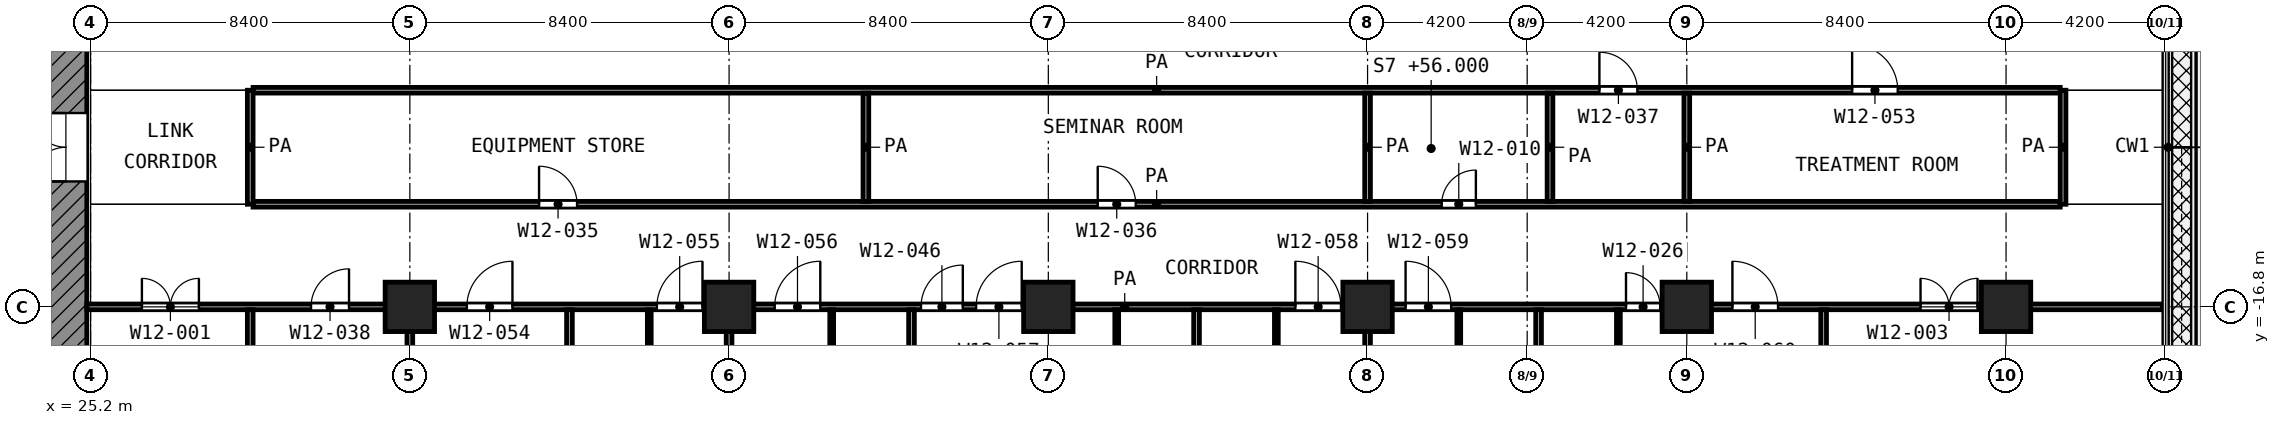
"""IFC4 building model, lengths in metres.
Left out: names, types, materials, properties, quantities, classifications, styles, units other than length and angle.
Written with IfcOpenShell. Run it as: python <this file> out.ifc"""

import sys

from ifc_helpers import new_model, si_unit, direction, frame, frame_2d, origin, origin_2d, place, context, subcontext, project, spatial, rectangle, extrude, element, fill, save


model = new_model("IFC4")
c1 = context("Model", 3, precision=1e-05, world=origin(), true_north=direction((0.0, 1.0)))
c2 = subcontext(c1, "Body", "Model", "MODEL_VIEW")
j1 = project(units=[si_unit("LENGTHUNIT", "METRE"), si_unit("PLANEANGLEUNIT", "RADIAN")], contexts=[c1])
p1 = place(None, origin())
s1 = spatial("IfcSite", under=j1, at=p1, CompositionType="ELEMENT")
p2 = place(p1, origin())
s2 = spatial("IfcBuilding", under=s1, at=p2, CompositionType="ELEMENT")
p3 = place(p2, frame((0.0, 0.0, 56.0)))
s3 = spatial("IfcBuildingStorey", under=s2, at=p3, CompositionType="ELEMENT", Elevation=56.0)
for number, where, z_axis, x_axis in (
    (1, (33.6, -16.8, 0.0), (0.0, 0.0, 1.0), (1.0, 0.0, 0.0)),
    (2, (42.0, -16.8, 0.0), (0.0, 0.0, 1.0), (1.0, 0.0, 0.0)),
    (3, (50.4, -16.8, 0.0), (0.0, 0.0, 1.0), (1.0, 0.0, 0.0)),
    (4, (58.8, -16.8, 0.0), (0.0, 0.0, 1.0), (1.0, 0.0, 0.0)),
    (5, (67.2, -16.8, 0.0), (0.0, 0.0, 1.0), (1.0, 0.0, 0.0)),
    (6, (75.6, -16.8, 0.0), (0.0, 0.0, 1.0), (1.0, 0.0, 0.0)),
):
    element("IfcColumn", number, at=place(p3, frame(where, z_axis=z_axis, x_axis=x_axis)), inside=s3, PredefinedType="COLUMN", context=c2, shape_type="SweptSolid", body=[
        extrude(rectangle(XDim=1.3, YDim=1.3, at=origin_2d()), origin(), (0.0, 0.0, 1.0), 4.2),
    ])
p4 = place(p3, frame((24.55, -24.0, 0.0), z_axis=(0.0, 0.0, 1.0), x_axis=(0.0, 1.0, 0.0)))
e7 = element("IfcWall", 7, at=p4, inside=s3, PredefinedType="SHEAR", context=c2, shape_type="SweptSolid", body=[
    extrude(rectangle(XDim=18.6, YDim=1.1, at=frame_2d((9.3, 0.0))), origin(), (0.0, 0.0, 1.0), 3.9),
])
p5 = place(p4, frame((10.5, 0.0, 0.0)))
e8 = element("IfcOpeningElement", 8, at=p5, cuts=e7, PredefinedType="OPENING", context=c2, shape_type="SweptSolid", body=[
    extrude(rectangle(XDim=1.8, YDim=2.1, at=frame_2d((0.9, 1.05))), frame((0.0, 0.56, 0.0), z_axis=(0.0, -1.0, 0.0), x_axis=(1.0, 0.0, 0.0)), (0.0, 0.0, 1.0), 1.12),
])
for number, where, z_axis, x_axis in (
    (9, (39.9, -19.5, 0.0), (0.0, 0.0, 1.0), (0.0, 1.0, 0.0)),
    (10, (44.7, -19.5, 0.0), (0.0, 0.0, 1.0), (0.0, 1.0, 0.0)),
):
    element("IfcWall", number, at=place(p3, frame(where, z_axis=z_axis, x_axis=x_axis)), inside=s3, PredefinedType="PARTITIONING", context=c2, shape_type="SweptSolid", body=[
        extrude(rectangle(XDim=2.625, YDim=0.1, at=frame_2d((1.312, 0.0))), origin(), (0.0, 0.0, 1.0), 3.9),
    ])
p6 = place(p3, frame((52.2, -19.499, 0.0), z_axis=(0.0, 0.0, 1.0), x_axis=(0.0, 1.0, 0.0)))
e11 = element("IfcWall", 11, at=p6, inside=s3, PredefinedType="PARTITIONING", context=c2, shape_type="SweptSolid", body=[
    extrude(rectangle(XDim=2.624, YDim=0.1, at=frame_2d((1.312, 0.0))), origin(), (0.0, 0.0, 1.0), 3.9),
])
for number, where, z_axis, x_axis in (
    (12, (56.4, -19.5, 0.0), (0.0, 0.0, 1.0), (0.0, 1.0, 0.0)),
    (13, (61.2, -19.5, 0.0), (0.0, 0.0, 1.0), (0.0, 1.0, 0.0)),
):
    element("IfcWall", number, at=place(p3, frame(where, z_axis=z_axis, x_axis=x_axis)), inside=s3, PredefinedType="PARTITIONING", context=c2, shape_type="SweptSolid", body=[
        extrude(rectangle(XDim=2.625, YDim=0.1, at=frame_2d((1.312, 0.0))), origin(), (0.0, 0.0, 1.0), 3.9),
    ])
p7 = place(p3, frame((65.4, -19.499, 0.0), z_axis=(0.0, 0.0, 1.0), x_axis=(0.0, 1.0, 0.0)))
e14 = element("IfcWall", 14, at=p7, inside=s3, PredefinedType="PARTITIONING", context=c2, shape_type="SweptSolid", body=[
    extrude(rectangle(XDim=2.624, YDim=0.1, at=frame_2d((1.312, 0.0))), origin(), (0.0, 0.0, 1.0), 3.9),
])
p8 = place(p3, frame((25.1, -16.8, 0.0), z_axis=(0.0, 0.0, 1.0), x_axis=(1.0, 0.0, 0.0)))
e15 = element("IfcWall", 15, at=p8, inside=s3, PredefinedType="PARTITIONING", context=c2, shape_type="SweptSolid", body=[
    extrude(rectangle(XDim=54.62, YDim=0.15, at=frame_2d((27.31, 0.0))), origin(), (0.0, 0.0, 1.0), 3.9),
])
p9 = place(p8, frame((1.45, 0.0, 0.0)))
e16 = element("IfcOpeningElement", 16, at=p9, cuts=e15, PredefinedType="OPENING", context=c2, shape_type="SweptSolid", body=[
    extrude(rectangle(XDim=1.5, YDim=2.1, at=frame_2d((0.75, 1.05))), frame((0.0, 0.085, 0.0), z_axis=(0.0, -1.0, 0.0), x_axis=(1.0, 0.0, 0.0)), (0.0, 0.0, 1.0), 0.17),
])
p10 = place(p8, frame((5.9, 0.0, 0.0)))
e17 = element("IfcOpeningElement", 17, at=p10, cuts=e15, PredefinedType="OPENING", context=c2, shape_type="SweptSolid", body=[
    extrude(rectangle(XDim=1.0, YDim=2.1, at=frame_2d((0.5, 1.05))), frame((0.0, 0.085, 0.0), z_axis=(0.0, -1.0, 0.0), x_axis=(1.0, 0.0, 0.0)), (0.0, 0.0, 1.0), 0.17),
])
p11 = place(p8, frame((10.0, 0.0, 0.0)))
e18 = element("IfcOpeningElement", 18, at=p11, cuts=e15, PredefinedType="OPENING", context=c2, shape_type="SweptSolid", body=[
    extrude(rectangle(XDim=1.2, YDim=2.1, at=frame_2d((0.6, 1.05))), frame((0.0, 0.085, 0.0), z_axis=(0.0, -1.0, 0.0), x_axis=(1.0, 0.0, 0.0)), (0.0, 0.0, 1.0), 0.17),
])
p12 = place(p8, frame((15.0, 0.0, 0.0)))
e19 = element("IfcOpeningElement", 19, at=p12, cuts=e15, PredefinedType="OPENING", context=c2, shape_type="SweptSolid", body=[
    extrude(rectangle(XDim=1.2, YDim=2.1, at=frame_2d((0.6, 1.05))), frame((0.0, 0.085, 0.0), z_axis=(0.0, -1.0, 0.0), x_axis=(1.0, 0.0, 0.0)), (0.0, 0.0, 1.0), 0.17),
])
p13 = place(p8, frame((18.1, 0.0, 0.0)))
e20 = element("IfcOpeningElement", 20, at=p13, cuts=e15, PredefinedType="OPENING", context=c2, shape_type="SweptSolid", body=[
    extrude(rectangle(XDim=1.2, YDim=2.1, at=frame_2d((0.6, 1.05))), frame((0.0, 0.085, 0.0), z_axis=(0.0, -1.0, 0.0), x_axis=(1.0, 0.0, 0.0)), (0.0, 0.0, 1.0), 0.17),
])
p14 = place(p8, frame((23.4, 0.0, 0.0)))
e21 = element("IfcOpeningElement", 21, at=p14, cuts=e15, PredefinedType="OPENING", context=c2, shape_type="SweptSolid", body=[
    extrude(rectangle(XDim=1.2, YDim=2.1, at=frame_2d((0.6, 1.05))), frame((0.0, 0.085, 0.0), z_axis=(0.0, -1.0, 0.0), x_axis=(1.0, 0.0, 0.0)), (0.0, 0.0, 1.0), 0.17),
])
p15 = place(p8, frame((21.95, 0.0, 0.0)))
e22 = element("IfcOpeningElement", 22, at=p15, cuts=e15, PredefinedType="OPENING", context=c2, shape_type="SweptSolid", body=[
    extrude(rectangle(XDim=1.1, YDim=2.1, at=frame_2d((0.55, 1.05))), frame((0.0, 0.085, 0.0), z_axis=(0.0, -1.0, 0.0), x_axis=(1.0, 0.0, 0.0)), (0.0, 0.0, 1.0), 0.17),
])
p16 = place(p8, frame((31.8, 0.0, 0.0)))
e23 = element("IfcOpeningElement", 23, at=p16, cuts=e15, PredefinedType="OPENING", context=c2, shape_type="SweptSolid", body=[
    extrude(rectangle(XDim=1.2, YDim=2.1, at=frame_2d((0.6, 1.05))), frame((0.0, 0.085, 0.0), z_axis=(0.0, -1.0, 0.0), x_axis=(1.0, 0.0, 0.0)), (0.0, 0.0, 1.0), 0.17),
])
p17 = place(p8, frame((34.7, 0.0, 0.0)))
e24 = element("IfcOpeningElement", 24, at=p17, cuts=e15, PredefinedType="OPENING", context=c2, shape_type="SweptSolid", body=[
    extrude(rectangle(XDim=1.2, YDim=2.1, at=frame_2d((0.6, 1.05))), frame((0.0, 0.085, 0.0), z_axis=(0.0, -1.0, 0.0), x_axis=(1.0, 0.0, 0.0)), (0.0, 0.0, 1.0), 0.17),
])
p18 = place(p8, frame((43.3, 0.0, 0.0)))
e25 = element("IfcOpeningElement", 25, at=p18, cuts=e15, PredefinedType="OPENING", context=c2, shape_type="SweptSolid", body=[
    extrude(rectangle(XDim=1.2, YDim=2.1, at=frame_2d((0.6, 1.05))), frame((0.0, 0.085, 0.0), z_axis=(0.0, -1.0, 0.0), x_axis=(1.0, 0.0, 0.0)), (0.0, 0.0, 1.0), 0.17),
])
p19 = place(p8, frame((40.5, 0.0, 0.0)))
e26 = element("IfcOpeningElement", 26, at=p19, cuts=e15, PredefinedType="OPENING", context=c2, shape_type="SweptSolid", body=[
    extrude(rectangle(XDim=0.9, YDim=2.1, at=frame_2d((0.45, 1.05))), frame((0.0, 0.085, 0.0), z_axis=(0.0, -1.0, 0.0), x_axis=(1.0, 0.0, 0.0)), (0.0, 0.0, 1.0), 0.17),
])
p20 = place(p8, frame((48.25, 0.0, 0.0)))
e27 = element("IfcOpeningElement", 27, at=p20, cuts=e15, PredefinedType="OPENING", context=c2, shape_type="SweptSolid", body=[
    extrude(rectangle(XDim=1.5, YDim=2.1, at=frame_2d((0.75, 1.05))), frame((0.0, 0.085, 0.0), z_axis=(0.0, -1.0, 0.0), x_axis=(1.0, 0.0, 0.0)), (0.0, 0.0, 1.0), 0.17),
])
p21 = place(p3, frame((29.475, -14.1, 0.0), z_axis=(0.0, 0.0, 1.0), x_axis=(1.0, 0.0, 0.0)))
e28 = element("IfcWall", 28, at=p21, inside=s3, PredefinedType="PARTITIONING", context=c2, shape_type="SweptSolid", body=[
    extrude(rectangle(XDim=47.55, YDim=0.15, at=frame_2d((23.775, 0.0))), origin(), (0.0, 0.0, 1.0), 3.9),
])
p22 = place(p21, frame((7.525, 0.0, 0.0)))
e29 = element("IfcOpeningElement", 29, at=p22, cuts=e28, PredefinedType="OPENING", context=c2, shape_type="SweptSolid", body=[
    extrude(rectangle(XDim=1.0, YDim=2.1, at=frame_2d((0.5, 1.05))), frame((0.0, 0.085, 0.0), z_axis=(0.0, -1.0, 0.0), x_axis=(1.0, 0.0, 0.0)), (0.0, 0.0, 1.0), 0.17),
])
p23 = place(p21, frame((22.225, 0.0, 0.0)))
e30 = element("IfcOpeningElement", 30, at=p23, cuts=e28, PredefinedType="OPENING", context=c2, shape_type="SweptSolid", body=[
    extrude(rectangle(XDim=1.0, YDim=2.1, at=frame_2d((0.5, 1.05))), frame((0.0, 0.085, 0.0), z_axis=(0.0, -1.0, 0.0), x_axis=(1.0, 0.0, 0.0)), (0.0, 0.0, 1.0), 0.17),
])
p24 = place(p21, frame((31.275, 0.0, 0.0)))
e31 = element("IfcOpeningElement", 31, at=p24, cuts=e28, PredefinedType="OPENING", context=c2, shape_type="SweptSolid", body=[
    extrude(rectangle(XDim=0.9, YDim=2.1, at=frame_2d((0.45, 1.05))), frame((0.0, 0.085, 0.0), z_axis=(0.0, -1.0, 0.0), x_axis=(1.0, 0.0, 0.0)), (0.0, 0.0, 1.0), 0.17),
])
p25 = place(p3, frame((29.475, -11.1, 0.0), z_axis=(0.0, 0.0, 1.0), x_axis=(1.0, 0.0, 0.0)))
e32 = element("IfcWall", 32, at=p25, inside=s3, PredefinedType="PARTITIONING", context=c2, shape_type="SweptSolid", body=[
    extrude(rectangle(XDim=47.55, YDim=0.15, at=frame_2d((23.775, 0.0))), origin(), (0.0, 0.0, 1.0), 3.9),
])
p26 = place(p25, frame((35.425, 0.0, 0.0)))
e33 = element("IfcOpeningElement", 33, at=p26, cuts=e32, PredefinedType="OPENING", context=c2, shape_type="SweptSolid", body=[
    extrude(rectangle(XDim=1.0, YDim=2.1, at=frame_2d((0.5, 1.05))), frame((0.0, 0.085, 0.0), z_axis=(0.0, -1.0, 0.0), x_axis=(1.0, 0.0, 0.0)), (0.0, 0.0, 1.0), 0.17),
])
p27 = place(p25, frame((42.075, 0.0, 0.0)))
e34 = element("IfcOpeningElement", 34, at=p27, cuts=e32, PredefinedType="OPENING", context=c2, shape_type="SweptSolid", body=[
    extrude(rectangle(XDim=1.2, YDim=2.1, at=frame_2d((0.6, 1.05))), frame((0.0, 0.085, 0.0), z_axis=(0.0, -1.0, 0.0), x_axis=(1.0, 0.0, 0.0)), (0.0, 0.0, 1.0), 0.17),
])
p28 = place(p3, frame((29.4, -25.2, 0.0), z_axis=(0.0, 0.0, 1.0), x_axis=(0.0, 1.0, 0.0)))
e35 = element("IfcWall", 35, at=p28, inside=s3, PredefinedType="PARTITIONING", context=c2, shape_type="SweptSolid", body=[
    extrude(rectangle(XDim=8.325, YDim=0.15, at=frame_2d((4.163, 0.0))), origin(), (0.0, 0.0, 1.0), 3.9),
])
p29 = place(p3, frame((29.4, -14.1, 0.0), z_axis=(0.0, 0.0, 1.0), x_axis=(0.0, 1.0, 0.0)))
e36 = element("IfcWall", 36, at=p29, inside=s3, PredefinedType="PARTITIONING", context=c2, shape_type="SweptSolid", body=[
    extrude(rectangle(XDim=3.0, YDim=0.15, at=frame_2d((1.5, 0.0))), origin(), (0.0, 0.0, 1.0), 3.9),
])
for number, where, z_axis, x_axis in (
    (37, (33.6, -25.12, 0.0), (0.0, 0.0, 1.0), (0.0, 1.0, 0.0)),
    (38, (37.8, -25.12, 0.0), (0.0, 0.0, 1.0), (0.0, 1.0, 0.0)),
    (39, (42.0, -25.12, 0.0), (0.0, 0.0, 1.0), (0.0, 1.0, 0.0)),
):
    element("IfcWall", number, at=place(p3, frame(where, z_axis=z_axis, x_axis=x_axis)), inside=s3, PredefinedType="PARTITIONING", context=c2, shape_type="SweptSolid", body=[
        extrude(rectangle(XDim=8.245, YDim=0.15, at=frame_2d((4.123, 0.0))), origin(), (0.0, 0.0, 1.0), 3.9),
    ])
p30 = place(p3, frame((45.6, -14.025, 0.0), z_axis=(0.0, 0.0, 1.0), x_axis=(0.0, 1.0, 0.0)))
e40 = element("IfcWall", 40, at=p30, inside=s3, PredefinedType="PARTITIONING", context=c2, shape_type="SweptSolid", body=[
    extrude(rectangle(XDim=2.85, YDim=0.15, at=frame_2d((1.425, 0.0))), origin(), (0.0, 0.0, 1.0), 3.9),
])
for number, where, z_axis, x_axis in (
    (41, (46.8, -25.12, 0.0), (0.0, 0.0, 1.0), (0.0, 1.0, 0.0)),
    (42, (54.3, -25.12, 0.0), (0.0, 0.0, 1.0), (0.0, 1.0, 0.0)),
    (43, (58.8, -25.12, 0.0), (0.0, 0.0, 1.0), (0.0, 1.0, 0.0)),
):
    element("IfcWall", number, at=place(p3, frame(where, z_axis=z_axis, x_axis=x_axis)), inside=s3, PredefinedType="PARTITIONING", context=c2, shape_type="SweptSolid", body=[
        extrude(rectangle(XDim=8.245, YDim=0.15, at=frame_2d((4.123, 0.0))), origin(), (0.0, 0.0, 1.0), 3.9),
    ])
p31 = place(p3, frame((58.8, -14.025, 0.0), z_axis=(0.0, 0.0, 1.0), x_axis=(0.0, 1.0, 0.0)))
e44 = element("IfcWall", 44, at=p31, inside=s3, PredefinedType="PARTITIONING", context=c2, shape_type="SweptSolid", body=[
    extrude(rectangle(XDim=2.85, YDim=0.15, at=frame_2d((1.425, 0.0))), origin(), (0.0, 0.0, 1.0), 3.9),
])
p32 = place(p3, frame((63.3, -25.12, 0.0), z_axis=(0.0, 0.0, 1.0), x_axis=(0.0, 1.0, 0.0)))
e45 = element("IfcWall", 45, at=p32, inside=s3, PredefinedType="PARTITIONING", context=c2, shape_type="SweptSolid", body=[
    extrude(rectangle(XDim=8.245, YDim=0.15, at=frame_2d((4.123, 0.0))), origin(), (0.0, 0.0, 1.0), 3.9),
])
for number, where, z_axis, x_axis in (
    (46, (63.6, -14.025, 0.0), (0.0, 0.0, 1.0), (0.0, 1.0, 0.0)),
    (47, (67.2, -14.025, 0.0), (0.0, 0.0, 1.0), (0.0, 1.0, 0.0)),
):
    element("IfcWall", number, at=place(p3, frame(where, z_axis=z_axis, x_axis=x_axis)), inside=s3, PredefinedType="PARTITIONING", context=c2, shape_type="SweptSolid", body=[
        extrude(rectangle(XDim=2.85, YDim=0.15, at=frame_2d((1.425, 0.0))), origin(), (0.0, 0.0, 1.0), 3.9),
    ])
p33 = place(p3, frame((70.8, -25.12, 0.0), z_axis=(0.0, 0.0, 1.0), x_axis=(0.0, 1.0, 0.0)))
e48 = element("IfcWall", 48, at=p33, inside=s3, PredefinedType="PARTITIONING", context=c2, shape_type="SweptSolid", body=[
    extrude(rectangle(XDim=8.245, YDim=0.15, at=frame_2d((4.123, 0.0))), origin(), (0.0, 0.0, 1.0), 3.9),
])
p34 = place(p3, frame((77.1, -14.1, 0.0), z_axis=(0.0, 0.0, 1.0), x_axis=(0.0, 1.0, 0.0)))
e49 = element("IfcWall", 49, at=p34, inside=s3, PredefinedType="PARTITIONING", context=c2, shape_type="SweptSolid", body=[
    extrude(rectangle(XDim=3.0, YDim=0.15, at=frame_2d((1.5, 0.0))), origin(), (0.0, 0.0, 1.0), 3.9),
])
p35 = place(p5, origin())
e50 = element("IfcDoor", 50, at=p35, inside=s3, OperationType="DOUBLE_DOOR_SINGLE_SWING", PredefinedType="DOOR", context=c2, shape_type="SweptSolid", body=[
    extrude(rectangle(XDim=1.8, YDim=2.1, at=frame_2d((0.9, 1.05))), frame((0.0, 0.025, 0.0), z_axis=(0.0, -1.0, 0.0), x_axis=(1.0, 0.0, 0.0)), (0.0, 0.0, 1.0), 0.05),
])
fill(e8, e50)
p36 = place(p9, origin())
e51 = element("IfcDoor", 51, at=p36, inside=s3, OperationType="DOUBLE_DOOR_SINGLE_SWING", PredefinedType="DOOR", context=c2, shape_type="SweptSolid", body=[
    extrude(rectangle(XDim=1.5, YDim=2.1, at=frame_2d((0.75, 1.05))), frame((0.0, 0.025, 0.0), z_axis=(0.0, -1.0, 0.0), x_axis=(1.0, 0.0, 0.0)), (0.0, 0.0, 1.0), 0.05),
])
fill(e16, e51)
p37 = place(p22, origin())
e52 = element("IfcDoor", 52, at=p37, inside=s3, OperationType="SINGLE_SWING_LEFT", PredefinedType="DOOR", context=c2, shape_type="SweptSolid", body=[
    extrude(rectangle(XDim=1.0, YDim=2.1, at=frame_2d((0.5, 1.05))), frame((0.0, 0.025, 0.0), z_axis=(0.0, -1.0, 0.0), x_axis=(1.0, 0.0, 0.0)), (0.0, 0.0, 1.0), 0.05),
])
fill(e29, e52)
p38 = place(p23, origin())
e53 = element("IfcDoor", 53, at=p38, inside=s3, OperationType="SINGLE_SWING_LEFT", PredefinedType="DOOR", context=c2, shape_type="SweptSolid", body=[
    extrude(rectangle(XDim=1.0, YDim=2.1, at=frame_2d((0.5, 1.05))), frame((0.0, 0.025, 0.0), z_axis=(0.0, -1.0, 0.0), x_axis=(1.0, 0.0, 0.0)), (0.0, 0.0, 1.0), 0.05),
])
fill(e30, e53)
p39 = place(p24, origin())
e54 = element("IfcDoor", 54, at=p39, inside=s3, OperationType="SINGLE_SWING_RIGHT", PredefinedType="DOOR", context=c2, shape_type="SweptSolid", body=[
    extrude(rectangle(XDim=0.9, YDim=2.1, at=frame_2d((0.45, 1.05))), frame((0.0, 0.025, 0.0), z_axis=(0.0, -1.0, 0.0), x_axis=(1.0, 0.0, 0.0)), (0.0, 0.0, 1.0), 0.05),
])
fill(e31, e54)
p40 = place(p26, origin())
e55 = element("IfcDoor", 55, at=p40, inside=s3, OperationType="SINGLE_SWING_LEFT", PredefinedType="DOOR", context=c2, shape_type="SweptSolid", body=[
    extrude(rectangle(XDim=1.0, YDim=2.1, at=frame_2d((0.5, 1.05))), frame((0.0, 0.025, 0.0), z_axis=(0.0, -1.0, 0.0), x_axis=(1.0, 0.0, 0.0)), (0.0, 0.0, 1.0), 0.05),
])
fill(e33, e55)
p41 = place(p27, origin())
e56 = element("IfcDoor", 56, at=p41, inside=s3, OperationType="SINGLE_SWING_LEFT", PredefinedType="DOOR", context=c2, shape_type="SweptSolid", body=[
    extrude(rectangle(XDim=1.2, YDim=2.1, at=frame_2d((0.6, 1.05))), frame((0.0, 0.025, 0.0), z_axis=(0.0, -1.0, 0.0), x_axis=(1.0, 0.0, 0.0)), (0.0, 0.0, 1.0), 0.05),
])
fill(e34, e56)
p42 = place(p10, origin())
e57 = element("IfcDoor", 57, at=p42, inside=s3, OperationType="SINGLE_SWING_RIGHT", PredefinedType="DOOR", context=c2, shape_type="SweptSolid", body=[
    extrude(rectangle(XDim=1.0, YDim=2.1, at=frame_2d((0.5, 1.05))), frame((0.0, 0.025, 0.0), z_axis=(0.0, -1.0, 0.0), x_axis=(1.0, 0.0, 0.0)), (0.0, 0.0, 1.0), 0.05),
])
fill(e17, e57)
p43 = place(p11, origin())
e58 = element("IfcDoor", 58, at=p43, inside=s3, OperationType="SINGLE_SWING_RIGHT", PredefinedType="DOOR", context=c2, shape_type="SweptSolid", body=[
    extrude(rectangle(XDim=1.2, YDim=2.1, at=frame_2d((0.6, 1.05))), frame((0.0, 0.025, 0.0), z_axis=(0.0, -1.0, 0.0), x_axis=(1.0, 0.0, 0.0)), (0.0, 0.0, 1.0), 0.05),
])
fill(e18, e58)
p44 = place(p12, origin())
e59 = element("IfcDoor", 59, at=p44, inside=s3, OperationType="SINGLE_SWING_RIGHT", PredefinedType="DOOR", context=c2, shape_type="SweptSolid", body=[
    extrude(rectangle(XDim=1.2, YDim=2.1, at=frame_2d((0.6, 1.05))), frame((0.0, 0.025, 0.0), z_axis=(0.0, -1.0, 0.0), x_axis=(1.0, 0.0, 0.0)), (0.0, 0.0, 1.0), 0.05),
])
fill(e19, e59)
p45 = place(p13, origin())
e60 = element("IfcDoor", 60, at=p45, inside=s3, OperationType="SINGLE_SWING_RIGHT", PredefinedType="DOOR", context=c2, shape_type="SweptSolid", body=[
    extrude(rectangle(XDim=1.2, YDim=2.1, at=frame_2d((0.6, 1.05))), frame((0.0, 0.025, 0.0), z_axis=(0.0, -1.0, 0.0), x_axis=(1.0, 0.0, 0.0)), (0.0, 0.0, 1.0), 0.05),
])
fill(e20, e60)
p46 = place(p14, origin())
e61 = element("IfcDoor", 61, at=p46, inside=s3, OperationType="SINGLE_SWING_RIGHT", PredefinedType="DOOR", context=c2, shape_type="SweptSolid", body=[
    extrude(rectangle(XDim=1.2, YDim=2.1, at=frame_2d((0.6, 1.05))), frame((0.0, 0.025, 0.0), z_axis=(0.0, -1.0, 0.0), x_axis=(1.0, 0.0, 0.0)), (0.0, 0.0, 1.0), 0.05),
])
fill(e21, e61)
p47 = place(p15, origin())
e62 = element("IfcDoor", 62, at=p47, inside=s3, OperationType="SINGLE_SWING_RIGHT", PredefinedType="DOOR", context=c2, shape_type="SweptSolid", body=[
    extrude(rectangle(XDim=1.1, YDim=2.1, at=frame_2d((0.55, 1.05))), frame((0.0, 0.025, 0.0), z_axis=(0.0, -1.0, 0.0), x_axis=(1.0, 0.0, 0.0)), (0.0, 0.0, 1.0), 0.05),
])
fill(e22, e62)
p48 = place(p16, origin())
e63 = element("IfcDoor", 63, at=p48, inside=s3, OperationType="SINGLE_SWING_LEFT", PredefinedType="DOOR", context=c2, shape_type="SweptSolid", body=[
    extrude(rectangle(XDim=1.2, YDim=2.1, at=frame_2d((0.6, 1.05))), frame((0.0, 0.025, 0.0), z_axis=(0.0, -1.0, 0.0), x_axis=(1.0, 0.0, 0.0)), (0.0, 0.0, 1.0), 0.05),
])
fill(e23, e63)
p49 = place(p17, origin())
e64 = element("IfcDoor", 64, at=p49, inside=s3, OperationType="SINGLE_SWING_LEFT", PredefinedType="DOOR", context=c2, shape_type="SweptSolid", body=[
    extrude(rectangle(XDim=1.2, YDim=2.1, at=frame_2d((0.6, 1.05))), frame((0.0, 0.025, 0.0), z_axis=(0.0, -1.0, 0.0), x_axis=(1.0, 0.0, 0.0)), (0.0, 0.0, 1.0), 0.05),
])
fill(e24, e64)
p50 = place(p18, origin())
e65 = element("IfcDoor", 65, at=p50, inside=s3, OperationType="SINGLE_SWING_LEFT", PredefinedType="DOOR", context=c2, shape_type="SweptSolid", body=[
    extrude(rectangle(XDim=1.2, YDim=2.1, at=frame_2d((0.6, 1.05))), frame((0.0, 0.025, 0.0), z_axis=(0.0, -1.0, 0.0), x_axis=(1.0, 0.0, 0.0)), (0.0, 0.0, 1.0), 0.05),
])
fill(e25, e65)
p51 = place(p19, origin())
e66 = element("IfcDoor", 66, at=p51, inside=s3, OperationType="SINGLE_SWING_LEFT", PredefinedType="DOOR", context=c2, shape_type="SweptSolid", body=[
    extrude(rectangle(XDim=0.9, YDim=2.1, at=frame_2d((0.45, 1.05))), frame((0.0, 0.025, 0.0), z_axis=(0.0, -1.0, 0.0), x_axis=(1.0, 0.0, 0.0)), (0.0, 0.0, 1.0), 0.05),
])
fill(e26, e66)
p52 = place(p20, origin())
e67 = element("IfcDoor", 67, at=p52, inside=s3, OperationType="DOUBLE_DOOR_SINGLE_SWING", PredefinedType="DOOR", context=c2, shape_type="SweptSolid", body=[
    extrude(rectangle(XDim=1.5, YDim=2.1, at=frame_2d((0.75, 1.05))), frame((0.0, 0.025, 0.0), z_axis=(0.0, -1.0, 0.0), x_axis=(1.0, 0.0, 0.0)), (0.0, 0.0, 1.0), 0.05),
])
fill(e27, e67)
save(model, sys.argv[1])
